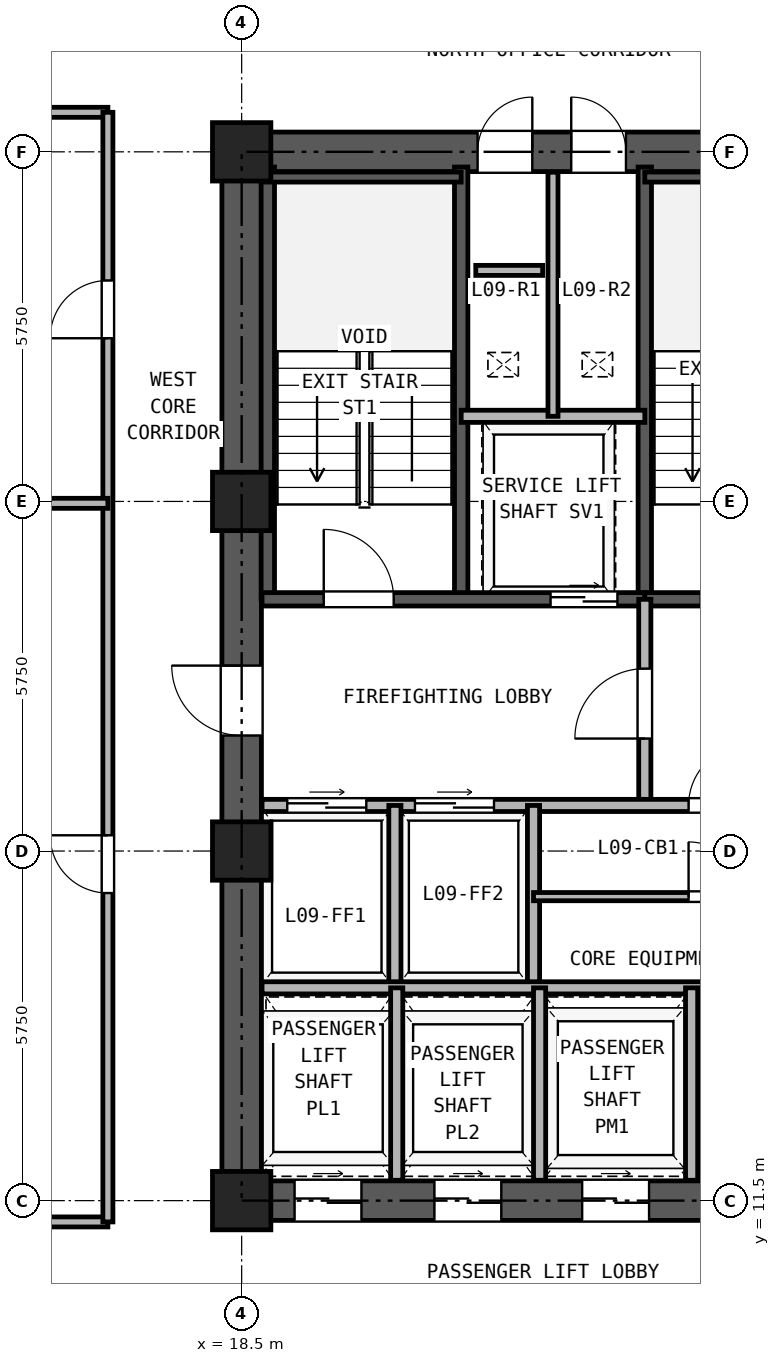
"""IFC4 building model, lengths in metres.
Left out: names, types, materials, properties, quantities, classifications, styles, units other than length and angle.
Written with IfcOpenShell. Run it as: python <this file> out.ifc"""

import sys

from ifc_helpers import new_model, si_unit, direction, frame, frame_2d, origin, origin_2d, place, context, subcontext, project, spatial, rectangle, hollow_rectangle, extrude, source, transform, mapped, element, fill, save


model = new_model("IFC4")
c1 = context("Model", 3, precision=1e-05, world=origin(), true_north=direction((0.0, 1.0)))
c2 = subcontext(c1, "Body", "Model", "MODEL_VIEW")
j1 = project(units=[si_unit("LENGTHUNIT", "METRE"), si_unit("PLANEANGLEUNIT", "RADIAN")], contexts=[c1])
p1 = place(None, origin())
s1 = spatial("IfcSite", under=j1, at=p1, CompositionType="ELEMENT")
p2 = place(p1, origin())
s2 = spatial("IfcBuilding", under=s1, at=p2, CompositionType="ELEMENT")
p3 = place(p2, frame((0.0, 0.0, 36.9)))
s3 = spatial("IfcBuildingStorey", under=s2, at=p3, CompositionType="ELEMENT", Elevation=36.9)
m1 = source(origin(), c2, "Body", "SweptSolid", [
    extrude(hollow_rectangle(XDim=0.96, YDim=0.96, WallThickness=0.06, at=origin_2d()), origin(), (0.0, 0.0, 1.0), 3.32),
])
for number, where, z_axis, x_axis in (
    (1, (18.5, 11.5, 0.0), (0.0, 0.0, 1.0), (1.0, 0.0, 0.0)),
    (2, (18.5, 17.25, 0.0), (0.0, 0.0, 1.0), (1.0, 0.0, 0.0)),
    (3, (18.5, 23.0, 0.0), (0.0, 0.0, 1.0), (1.0, 0.0, 0.0)),
    (4, (18.5, 28.75, 0.0), (0.0, 0.0, 1.0), (1.0, 0.0, 0.0)),
):
    element("IfcColumn", number, at=place(p3, frame(where, z_axis=z_axis, x_axis=x_axis)), inside=s3, PredefinedType="COLUMN", context=c2, shape_type="MappedRepresentation", body=[
        mapped(m1, transform((0.0, 0.0, 0.0), x_axis=(1.0, 0.0, 0.0), y_axis=(0.0, 1.0, 0.0), z_axis=(0.0, 0.0, 1.0), scale=1.0)),
    ])
p4 = place(p3, frame((18.175, 11.5, 0.0), z_axis=(0.0, 0.0, 1.0), x_axis=(1.0, 0.0, 0.0)))
e5 = element("IfcWall", 5, at=p4, inside=s3, PredefinedType="SHEAR", context=c2, shape_type="SweptSolid", body=[
    extrude(rectangle(XDim=10.65, YDim=0.65, at=frame_2d((5.325, 0.0))), origin(), (0.0, 0.0, 1.0), 3.32),
])
p5 = place(p4, frame((1.195, 0.0, 0.0)))
e6 = element("IfcOpeningElement", 6, at=p5, cuts=e5, PredefinedType="OPENING", context=c2, shape_type="SweptSolid", body=[
    extrude(rectangle(XDim=1.1, YDim=2.25, at=frame_2d((0.55, 1.125))), frame((0.0, 0.335, 0.0), z_axis=(0.0, -1.0, 0.0), x_axis=(1.0, 0.0, 0.0)), (0.0, 0.0, 1.0), 0.67),
])
p6 = place(p4, frame((3.495, 0.0, 0.0)))
e7 = element("IfcOpeningElement", 7, at=p6, cuts=e5, PredefinedType="OPENING", context=c2, shape_type="SweptSolid", body=[
    extrude(rectangle(XDim=1.1, YDim=2.25, at=frame_2d((0.55, 1.125))), frame((0.0, 0.335, 0.0), z_axis=(0.0, -1.0, 0.0), x_axis=(1.0, 0.0, 0.0)), (0.0, 0.0, 1.0), 0.67),
])
p7 = place(p4, frame((5.925, 0.0, 0.0)))
e8 = element("IfcOpeningElement", 8, at=p7, cuts=e5, PredefinedType="OPENING", context=c2, shape_type="SweptSolid", body=[
    extrude(rectangle(XDim=1.1, YDim=2.25, at=frame_2d((0.55, 1.125))), frame((0.0, 0.335, 0.0), z_axis=(0.0, -1.0, 0.0), x_axis=(1.0, 0.0, 0.0)), (0.0, 0.0, 1.0), 0.67),
])
p8 = place(p4, frame((8.325, 0.0, 0.0)))
e9 = element("IfcOpeningElement", 9, at=p8, cuts=e5, PredefinedType="OPENING", context=c2, shape_type="SweptSolid", body=[
    extrude(rectangle(XDim=1.1, YDim=2.25, at=frame_2d((0.55, 1.125))), frame((0.0, 0.335, 0.0), z_axis=(0.0, -1.0, 0.0), x_axis=(1.0, 0.0, 0.0)), (0.0, 0.0, 1.0), 0.67),
])
p9 = place(p3, frame((18.175, 28.75, 0.0), z_axis=(0.0, 0.0, 1.0), x_axis=(1.0, 0.0, 0.0)))
e10 = element("IfcWall", 10, at=p9, inside=s3, PredefinedType="SHEAR", context=c2, shape_type="SweptSolid", body=[
    extrude(rectangle(XDim=10.65, YDim=0.65, at=frame_2d((5.325, 0.0))), origin(), (0.0, 0.0, 1.0), 3.32),
])
p10 = place(p9, frame((4.205, 0.0, 0.0)))
e11 = element("IfcOpeningElement", 11, at=p10, cuts=e10, PredefinedType="OPENING", context=c2, shape_type="SweptSolid", body=[
    extrude(rectangle(XDim=0.9, YDim=2.05, at=frame_2d((0.45, 1.025))), frame((0.0, 0.335, 0.0), z_axis=(0.0, -1.0, 0.0), x_axis=(1.0, 0.0, 0.0)), (0.0, 0.0, 1.0), 0.67),
])
p11 = place(p9, frame((5.745, 0.0, 0.0)))
e12 = element("IfcOpeningElement", 12, at=p11, cuts=e10, PredefinedType="OPENING", context=c2, shape_type="SweptSolid", body=[
    extrude(rectangle(XDim=0.9, YDim=2.05, at=frame_2d((0.45, 1.025))), frame((0.0, 0.335, 0.0), z_axis=(0.0, -1.0, 0.0), x_axis=(1.0, 0.0, 0.0)), (0.0, 0.0, 1.0), 0.67),
])
p12 = place(p3, frame((18.5, 11.825, 0.0), z_axis=(0.0, 0.0, 1.0), x_axis=(0.0, 1.0, 0.0)))
e13 = element("IfcWall", 13, at=p12, inside=s3, PredefinedType="SHEAR", context=c2, shape_type="SweptSolid", body=[
    extrude(rectangle(XDim=16.6, YDim=0.65, at=frame_2d((8.3, 0.0))), origin(), (0.0, 0.0, 1.0), 3.32),
])
p13 = place(p12, frame((7.325, 0.0, 0.0)))
e14 = element("IfcOpeningElement", 14, at=p13, cuts=e13, PredefinedType="OPENING", context=c2, shape_type="SweptSolid", body=[
    extrude(rectangle(XDim=1.15, YDim=2.2, at=frame_2d((0.575, 1.1))), frame((0.0, 0.335, 0.0), z_axis=(0.0, -1.0, 0.0), x_axis=(1.0, 0.0, 0.0)), (0.0, 0.0, 1.0), 0.67),
])
for number, where, z_axis, x_axis in (
    (15, (18.93, 21.39, 0.0), (0.0, 0.0, 1.0), (0.0, 1.0, 0.0)),
    (16, (22.11, 21.39, 0.0), (0.0, 0.0, 1.0), (0.0, 1.0, 0.0)),
    (17, (25.13, 21.39, 0.0), (0.0, 0.0, 1.0), (0.0, 1.0, 0.0)),
):
    element("IfcWall", number, at=place(p3, frame(where, z_axis=z_axis, x_axis=x_axis)), inside=s3, PredefinedType="SOLIDWALL", context=c2, shape_type="SweptSolid", body=[
        extrude(rectangle(XDim=7.11, YDim=0.22, at=frame_2d((3.555, 0.0))), origin(), (0.0, 0.0, 1.0), 3.32),
    ])
p14 = place(p3, frame((18.835, 28.335, 0.0), z_axis=(0.0, 0.0, 1.0), x_axis=(1.0, 0.0, 0.0)))
e18 = element("IfcWall", 18, at=p14, inside=s3, PredefinedType="PARTITIONING", context=c2, shape_type="SweptSolid", body=[
    extrude(rectangle(XDim=3.275, YDim=0.165, at=frame_2d((1.638, 0.0))), origin(), (0.0, 0.0, 1.0), 3.32),
])
p15 = place(p3, frame((25.13, 28.335, 0.0), z_axis=(0.0, 0.0, 1.0), x_axis=(1.0, 0.0, 0.0)))
e19 = element("IfcWall", 19, at=p15, inside=s3, PredefinedType="PARTITIONING", context=c2, shape_type="SweptSolid", body=[
    extrude(rectangle(XDim=3.035, YDim=0.165, at=frame_2d((1.518, 0.0))), origin(), (0.0, 0.0, 1.0), 3.32),
])
p16 = place(p3, frame((18.835, 21.39, 0.0), z_axis=(0.0, 0.0, 1.0), x_axis=(1.0, 0.0, 0.0)))
e20 = element("IfcWall", 20, at=p16, inside=s3, PredefinedType="SOLIDWALL", context=c2, shape_type="SweptSolid", body=[
    extrude(rectangle(XDim=6.295, YDim=0.22, at=frame_2d((3.147, 0.0))), origin(), (0.0, 0.0, 1.0), 3.32),
])
p17 = place(p16, frame((1.015, 0.0, 0.0)))
e21 = element("IfcOpeningElement", 21, at=p17, cuts=e20, PredefinedType="OPENING", context=c2, shape_type="SweptSolid", body=[
    extrude(rectangle(XDim=1.15, YDim=2.2, at=frame_2d((0.575, 1.1))), frame((0.0, 0.12, 0.0), z_axis=(0.0, -1.0, 0.0), x_axis=(1.0, 0.0, 0.0)), (0.0, 0.0, 1.0), 0.24),
])
p18 = place(p16, frame((4.745, 0.0, 0.0)))
e22 = element("IfcOpeningElement", 22, at=p18, cuts=e20, PredefinedType="OPENING", context=c2, shape_type="SweptSolid", body=[
    extrude(rectangle(XDim=1.1, YDim=2.25, at=frame_2d((0.55, 1.125))), frame((0.0, 0.12, 0.0), z_axis=(0.0, -1.0, 0.0), x_axis=(1.0, 0.0, 0.0)), (0.0, 0.0, 1.0), 0.24),
])
p19 = place(p3, frame((25.13, 21.39, 0.0), z_axis=(0.0, 0.0, 1.0), x_axis=(1.0, 0.0, 0.0)))
e23 = element("IfcWall", 23, at=p19, inside=s3, PredefinedType="SOLIDWALL", context=c2, shape_type="SweptSolid", body=[
    extrude(rectangle(XDim=3.035, YDim=0.22, at=frame_2d((1.518, 0.0))), origin(), (0.0, 0.0, 1.0), 3.32),
])
p20 = place(p19, frame((0.92, 0.0, 0.0)))
e24 = element("IfcOpeningElement", 24, at=p20, cuts=e23, PredefinedType="OPENING", context=c2, shape_type="SweptSolid", body=[
    extrude(rectangle(XDim=1.15, YDim=2.2, at=frame_2d((0.575, 1.1))), frame((0.0, 0.12, 0.0), z_axis=(0.0, -1.0, 0.0), x_axis=(1.0, 0.0, 0.0)), (0.0, 0.0, 1.0), 0.24),
])
p21 = place(p3, frame((22.11, 24.4, 0.0), z_axis=(0.0, 0.0, 1.0), x_axis=(1.0, 0.0, 0.0)))
e25 = element("IfcWall", 25, at=p21, inside=s3, PredefinedType="PARTITIONING", context=c2, shape_type="SweptSolid", body=[
    extrude(rectangle(XDim=3.02, YDim=0.2, at=frame_2d((1.51, 0.0))), origin(), (0.0, 0.0, 1.0), 3.32),
])
p22 = place(p3, frame((23.62, 24.4, 0.0), z_axis=(0.0, 0.0, 1.0), x_axis=(0.0, 1.0, 0.0)))
e26 = element("IfcWall", 26, at=p22, inside=s3, PredefinedType="PARTITIONING", context=c2, shape_type="SweptSolid", body=[
    extrude(rectangle(XDim=4.015, YDim=0.165, at=frame_2d((2.008, 0.0))), origin(), (0.0, 0.0, 1.0), 3.32),
])
p23 = place(p3, frame((25.13, 18.0, 0.0), z_axis=(0.0, 0.0, 1.0), x_axis=(0.0, 1.0, 0.0)))
e27 = element("IfcWall", 27, at=p23, inside=s3, PredefinedType="PARTITIONING", context=c2, shape_type="SweptSolid", body=[
    extrude(rectangle(XDim=3.39, YDim=0.2, at=frame_2d((1.695, 0.0))), origin(), (0.0, 0.0, 1.0), 3.32),
])
p24 = place(p23, frame((1.1, 0.0, 0.0)))
e28 = element("IfcOpeningElement", 28, at=p24, cuts=e27, PredefinedType="OPENING", context=c2, shape_type="SweptSolid", body=[
    extrude(rectangle(XDim=1.15, YDim=2.2, at=frame_2d((0.575, 1.1))), frame((0.0, 0.11, 0.0), z_axis=(0.0, -1.0, 0.0), x_axis=(1.0, 0.0, 0.0)), (0.0, 0.0, 1.0), 0.22),
])
p25 = place(p3, frame((18.835, 18.0, 0.0), z_axis=(0.0, 0.0, 1.0), x_axis=(1.0, 0.0, 0.0)))
e29 = element("IfcWall", 29, at=p25, inside=s3, PredefinedType="PARTITIONING", context=c2, shape_type="SweptSolid", body=[
    extrude(rectangle(XDim=9.33, YDim=0.2, at=frame_2d((4.665, 0.0))), origin(), (0.0, 0.0, 1.0), 3.32),
])
p26 = place(p25, frame((0.415, 0.0, 0.0)))
e30 = element("IfcOpeningElement", 30, at=p26, cuts=e29, PredefinedType="OPENING", context=c2, shape_type="SweptSolid", body=[
    extrude(rectangle(XDim=1.3, YDim=2.3, at=frame_2d((0.65, 1.15))), frame((0.0, 0.11, 0.0), z_axis=(0.0, -1.0, 0.0), x_axis=(1.0, 0.0, 0.0)), (0.0, 0.0, 1.0), 0.22),
])
p27 = place(p25, frame((2.515, 0.0, 0.0)))
e31 = element("IfcOpeningElement", 31, at=p27, cuts=e29, PredefinedType="OPENING", context=c2, shape_type="SweptSolid", body=[
    extrude(rectangle(XDim=1.3, YDim=2.3, at=frame_2d((0.65, 1.15))), frame((0.0, 0.11, 0.0), z_axis=(0.0, -1.0, 0.0), x_axis=(1.0, 0.0, 0.0)), (0.0, 0.0, 1.0), 0.22),
])
p28 = place(p25, frame((7.015, 0.0, 0.0)))
e32 = element("IfcOpeningElement", 32, at=p28, cuts=e29, PredefinedType="OPENING", context=c2, shape_type="SweptSolid", body=[
    extrude(rectangle(XDim=1.0, YDim=2.15, at=frame_2d((0.5, 1.075))), frame((0.0, 0.11, 0.0), z_axis=(0.0, -1.0, 0.0), x_axis=(1.0, 0.0, 0.0)), (0.0, 0.0, 1.0), 0.22),
])
for number, where, z_axis, x_axis in (
    (33, (21.02, 15.0, 0.0), (0.0, 0.0, 1.0), (0.0, 1.0, 0.0)),
    (34, (23.3, 15.0, 0.0), (0.0, 0.0, 1.0), (0.0, 1.0, 0.0)),
):
    element("IfcWall", number, at=place(p3, frame(where, z_axis=z_axis, x_axis=x_axis)), inside=s3, PredefinedType="PARTITIONING", context=c2, shape_type="SweptSolid", body=[
        extrude(rectangle(XDim=3.0, YDim=0.2, at=frame_2d((1.5, 0.0))), origin(), (0.0, 0.0, 1.0), 3.32),
    ])
p29 = place(p3, frame((18.835, 15.0, 0.0), z_axis=(0.0, 0.0, 1.0), x_axis=(1.0, 0.0, 0.0)))
e35 = element("IfcWall", 35, at=p29, inside=s3, PredefinedType="PARTITIONING", context=c2, shape_type="SweptSolid", body=[
    extrude(rectangle(XDim=9.33, YDim=0.2, at=frame_2d((4.665, 0.0))), origin(), (0.0, 0.0, 1.0), 3.32),
])
p30 = place(p3, frame((23.3, 16.5, 0.0), z_axis=(0.0, 0.0, 1.0), x_axis=(1.0, 0.0, 0.0)))
e36 = element("IfcWall", 36, at=p30, inside=s3, PredefinedType="PARTITIONING", context=c2, shape_type="SweptSolid", body=[
    extrude(rectangle(XDim=4.865, YDim=0.135, at=frame_2d((2.433, 0.0))), origin(), (0.0, 0.0, 1.0), 3.32),
])
p31 = place(p30, frame((2.55, 0.0, 0.0)))
e37 = element("IfcOpeningElement", 37, at=p31, cuts=e36, PredefinedType="OPENING", context=c2, shape_type="SweptSolid", body=[
    extrude(rectangle(XDim=0.9, YDim=2.05, at=frame_2d((0.45, 1.025))), frame((0.0, 0.077, 0.0), z_axis=(0.0, -1.0, 0.0), x_axis=(1.0, 0.0, 0.0)), (0.0, 0.0, 1.0), 0.155),
])
for number, where, z_axis, x_axis in (
    (38, (21.05, 11.835, 0.0), (0.0, 0.0, 1.0), (0.0, 1.0, 0.0)),
    (39, (23.4, 11.835, 0.0), (0.0, 0.0, 1.0), (0.0, 1.0, 0.0)),
    (40, (25.9, 11.835, 0.0), (0.0, 0.0, 1.0), (0.0, 1.0, 0.0)),
):
    element("IfcWall", number, at=place(p3, frame(where, z_axis=z_axis, x_axis=x_axis)), inside=s3, PredefinedType="PARTITIONING", context=c2, shape_type="SweptSolid", body=[
        extrude(rectangle(XDim=3.165, YDim=0.2, at=frame_2d((1.583, 0.0))), origin(), (0.0, 0.0, 1.0), 3.32),
    ])
for number, where, z_axis, x_axis in (
    (41, (7.4, 11.15, 0.0), (0.0, 0.0, 1.0), (1.0, 0.0, 0.0)),
    (42, (7.4, 29.4, 0.0), (0.0, 0.0, 1.0), (1.0, 0.0, 0.0)),
):
    element("IfcWall", number, at=place(p3, frame(where, z_axis=z_axis, x_axis=x_axis)), inside=s3, PredefinedType="PARTITIONING", context=c2, shape_type="SweptSolid", body=[
        extrude(rectangle(XDim=8.9, YDim=0.165, at=frame_2d((4.45, 0.0))), origin(), (0.0, 0.0, 1.0), 3.32),
    ])
p32 = place(p3, frame((16.3, 11.15, 0.0), z_axis=(0.0, 0.0, 1.0), x_axis=(0.0, 1.0, 0.0)))
e43 = element("IfcWall", 43, at=p32, inside=s3, PredefinedType="PARTITIONING", context=c2, shape_type="SweptSolid", body=[
    extrude(rectangle(XDim=18.25, YDim=0.165, at=frame_2d((9.125, 0.0))), origin(), (0.0, 0.0, 1.0), 3.32),
])
p33 = place(p32, frame((5.409, 0.0, 0.0)))
e44 = element("IfcOpeningElement", 44, at=p33, cuts=e43, PredefinedType="OPENING", context=c2, shape_type="SweptSolid", body=[
    extrude(rectangle(XDim=0.95, YDim=2.15, at=frame_2d((0.475, 1.075))), frame((0.0, 0.093, 0.0), z_axis=(0.0, -1.0, 0.0), x_axis=(1.0, 0.0, 0.0)), (0.0, 0.0, 1.0), 0.185),
])
p34 = place(p32, frame((14.534, 0.0, 0.0)))
e45 = element("IfcOpeningElement", 45, at=p34, cuts=e43, PredefinedType="OPENING", context=c2, shape_type="SweptSolid", body=[
    extrude(rectangle(XDim=0.95, YDim=2.15, at=frame_2d((0.475, 1.075))), frame((0.0, 0.093, 0.0), z_axis=(0.0, -1.0, 0.0), x_axis=(1.0, 0.0, 0.0)), (0.0, 0.0, 1.0), 0.185),
])
p35 = place(p3, frame((7.4, 22.969, 0.0), z_axis=(0.0, 0.0, 1.0), x_axis=(1.0, 0.0, 0.0)))
e46 = element("IfcWall", 46, at=p35, inside=s3, PredefinedType="PARTITIONING", context=c2, shape_type="SweptSolid", body=[
    extrude(rectangle(XDim=8.9, YDim=0.165, at=frame_2d((4.45, 0.0))), origin(), (0.0, 0.0, 1.0), 2.539),
])
p36 = place(p3, frame((22.35, 26.8, 0.0), z_axis=(0.0, 0.0, 1.0), x_axis=(1.0, 0.0, 0.0)))
e47 = element("IfcWall", 47, at=p36, inside=s3, PredefinedType="PARTITIONING", context=c2, shape_type="SweptSolid", body=[
    extrude(rectangle(XDim=1.1, YDim=0.165, at=frame_2d((0.55, 0.0))), origin(), (0.0, 0.0, 1.0), 3.32),
])
p37 = place(p17, frame((1.15, 0.0, 0.0), z_axis=(0.0, 0.0, 1.0), x_axis=(-1.0, 0.0, 0.0)))
e48 = element("IfcDoor", 48, at=p37, inside=s3, OperationType="SINGLE_SWING_LEFT", PredefinedType="DOOR", context=c2, shape_type="SweptSolid", body=[
    extrude(rectangle(XDim=1.15, YDim=2.2, at=frame_2d((0.575, 1.1))), frame((0.0, 0.025, 0.0), z_axis=(0.0, -1.0, 0.0), x_axis=(1.0, 0.0, 0.0)), (0.0, 0.0, 1.0), 0.05),
])
fill(e21, e48)
p38 = place(p18, frame((1.1, 0.0, 0.0), z_axis=(0.0, 0.0, 1.0), x_axis=(-1.0, 0.0, 0.0)))
e49 = element("IfcDoor", 49, at=p38, inside=s3, OperationType="DOUBLE_DOOR_SLIDING", PredefinedType="DOOR", context=c2, shape_type="SweptSolid", body=[
    extrude(rectangle(XDim=1.1, YDim=2.25, at=frame_2d((0.55, 1.125))), frame((0.0, 0.025, 0.0), z_axis=(0.0, -1.0, 0.0), x_axis=(1.0, 0.0, 0.0)), (0.0, 0.0, 1.0), 0.05),
])
fill(e22, e49)
p39 = place(p24, origin())
e50 = element("IfcDoor", 50, at=p39, inside=s3, OperationType="SINGLE_SWING_LEFT", PredefinedType="DOOR", context=c2, shape_type="SweptSolid", body=[
    extrude(rectangle(XDim=1.15, YDim=2.2, at=frame_2d((0.575, 1.1))), frame((0.0, 0.025, 0.0), z_axis=(0.0, -1.0, 0.0), x_axis=(1.0, 0.0, 0.0)), (0.0, 0.0, 1.0), 0.05),
])
fill(e28, e50)
p40 = place(p26, origin())
e51 = element("IfcDoor", 51, at=p40, inside=s3, OperationType="DOUBLE_DOOR_SLIDING", PredefinedType="DOOR", context=c2, shape_type="SweptSolid", body=[
    extrude(rectangle(XDim=1.3, YDim=2.3, at=frame_2d((0.65, 1.15))), frame((0.0, 0.025, 0.0), z_axis=(0.0, -1.0, 0.0), x_axis=(1.0, 0.0, 0.0)), (0.0, 0.0, 1.0), 0.05),
])
fill(e30, e51)
p41 = place(p27, origin())
e52 = element("IfcDoor", 52, at=p41, inside=s3, OperationType="DOUBLE_DOOR_SLIDING", PredefinedType="DOOR", context=c2, shape_type="SweptSolid", body=[
    extrude(rectangle(XDim=1.3, YDim=2.3, at=frame_2d((0.65, 1.15))), frame((0.0, 0.025, 0.0), z_axis=(0.0, -1.0, 0.0), x_axis=(1.0, 0.0, 0.0)), (0.0, 0.0, 1.0), 0.05),
])
fill(e31, e52)
p42 = place(p28, frame((1.0, 0.0, 0.0), z_axis=(0.0, 0.0, 1.0), x_axis=(-1.0, 0.0, 0.0)))
e53 = element("IfcDoor", 53, at=p42, inside=s3, OperationType="SINGLE_SWING_RIGHT", PredefinedType="DOOR", context=c2, shape_type="SweptSolid", body=[
    extrude(rectangle(XDim=1.0, YDim=2.15, at=frame_2d((0.5, 1.075))), frame((0.0, 0.025, 0.0), z_axis=(0.0, -1.0, 0.0), x_axis=(1.0, 0.0, 0.0)), (0.0, 0.0, 1.0), 0.05),
])
fill(e32, e53)
p43 = place(p31, frame((0.9, 0.0, 0.0), z_axis=(0.0, 0.0, 1.0), x_axis=(-1.0, 0.0, 0.0)))
e54 = element("IfcDoor", 54, at=p43, inside=s3, OperationType="SINGLE_SWING_LEFT", PredefinedType="DOOR", context=c2, shape_type="SweptSolid", body=[
    extrude(rectangle(XDim=0.9, YDim=2.05, at=frame_2d((0.45, 1.025))), frame((0.0, 0.025, 0.0), z_axis=(0.0, -1.0, 0.0), x_axis=(1.0, 0.0, 0.0)), (0.0, 0.0, 1.0), 0.05),
])
fill(e37, e54)
p44 = place(p13, frame((1.15, 0.0, 0.0), z_axis=(0.0, 0.0, 1.0), x_axis=(-1.0, 0.0, 0.0)))
e55 = element("IfcDoor", 55, at=p44, inside=s3, OperationType="SINGLE_SWING_RIGHT", PredefinedType="DOOR", context=c2, shape_type="SweptSolid", body=[
    extrude(rectangle(XDim=1.15, YDim=2.2, at=frame_2d((0.575, 1.1))), frame((0.0, 0.025, 0.0), z_axis=(0.0, -1.0, 0.0), x_axis=(1.0, 0.0, 0.0)), (0.0, 0.0, 1.0), 0.05),
])
fill(e14, e55)
p45 = place(p10, origin())
e56 = element("IfcDoor", 56, at=p45, inside=s3, OperationType="SINGLE_SWING_RIGHT", PredefinedType="DOOR", context=c2, shape_type="SweptSolid", body=[
    extrude(rectangle(XDim=0.9, YDim=2.05, at=frame_2d((0.45, 1.025))), frame((0.0, 0.025, 0.0), z_axis=(0.0, -1.0, 0.0), x_axis=(1.0, 0.0, 0.0)), (0.0, 0.0, 1.0), 0.05),
])
fill(e11, e56)
p46 = place(p11, origin())
e57 = element("IfcDoor", 57, at=p46, inside=s3, OperationType="SINGLE_SWING_LEFT", PredefinedType="DOOR", context=c2, shape_type="SweptSolid", body=[
    extrude(rectangle(XDim=0.9, YDim=2.05, at=frame_2d((0.45, 1.025))), frame((0.0, 0.025, 0.0), z_axis=(0.0, -1.0, 0.0), x_axis=(1.0, 0.0, 0.0)), (0.0, 0.0, 1.0), 0.05),
])
fill(e12, e57)
p47 = place(p5, frame((1.1, 0.0, 0.0), z_axis=(0.0, 0.0, 1.0), x_axis=(-1.0, 0.0, 0.0)))
e58 = element("IfcDoor", 58, at=p47, inside=s3, OperationType="DOUBLE_DOOR_SLIDING", PredefinedType="DOOR", context=c2, shape_type="SweptSolid", body=[
    extrude(rectangle(XDim=1.1, YDim=2.25, at=frame_2d((0.55, 1.125))), frame((0.0, 0.025, 0.0), z_axis=(0.0, -1.0, 0.0), x_axis=(1.0, 0.0, 0.0)), (0.0, 0.0, 1.0), 0.05),
])
fill(e6, e58)
p48 = place(p6, frame((1.1, 0.0, 0.0), z_axis=(0.0, 0.0, 1.0), x_axis=(-1.0, 0.0, 0.0)))
e59 = element("IfcDoor", 59, at=p48, inside=s3, OperationType="DOUBLE_DOOR_SLIDING", PredefinedType="DOOR", context=c2, shape_type="SweptSolid", body=[
    extrude(rectangle(XDim=1.1, YDim=2.25, at=frame_2d((0.55, 1.125))), frame((0.0, 0.025, 0.0), z_axis=(0.0, -1.0, 0.0), x_axis=(1.0, 0.0, 0.0)), (0.0, 0.0, 1.0), 0.05),
])
fill(e7, e59)
p49 = place(p7, frame((1.1, 0.0, 0.0), z_axis=(0.0, 0.0, 1.0), x_axis=(-1.0, 0.0, 0.0)))
e60 = element("IfcDoor", 60, at=p49, inside=s3, OperationType="DOUBLE_DOOR_SLIDING", PredefinedType="DOOR", context=c2, shape_type="SweptSolid", body=[
    extrude(rectangle(XDim=1.1, YDim=2.25, at=frame_2d((0.55, 1.125))), frame((0.0, 0.025, 0.0), z_axis=(0.0, -1.0, 0.0), x_axis=(1.0, 0.0, 0.0)), (0.0, 0.0, 1.0), 0.05),
])
fill(e8, e60)
p50 = place(p33, frame((0.95, 0.0, 0.0), z_axis=(0.0, 0.0, 1.0), x_axis=(-1.0, 0.0, 0.0)))
e61 = element("IfcDoor", 61, at=p50, inside=s3, OperationType="SINGLE_SWING_RIGHT", PredefinedType="DOOR", context=c2, shape_type="SweptSolid", body=[
    extrude(rectangle(XDim=0.95, YDim=2.15, at=frame_2d((0.475, 1.075))), frame((0.0, 0.025, 0.0), z_axis=(0.0, -1.0, 0.0), x_axis=(1.0, 0.0, 0.0)), (0.0, 0.0, 1.0), 0.05),
])
fill(e44, e61)
p51 = place(p34, frame((0.95, 0.0, 0.0), z_axis=(0.0, 0.0, 1.0), x_axis=(-1.0, 0.0, 0.0)))
e62 = element("IfcDoor", 62, at=p51, inside=s3, OperationType="SINGLE_SWING_LEFT", PredefinedType="DOOR", context=c2, shape_type="SweptSolid", body=[
    extrude(rectangle(XDim=0.95, YDim=2.15, at=frame_2d((0.475, 1.075))), frame((0.0, 0.025, 0.0), z_axis=(0.0, -1.0, 0.0), x_axis=(1.0, 0.0, 0.0)), (0.0, 0.0, 1.0), 0.05),
])
fill(e45, e62)
save(model, sys.argv[1])
